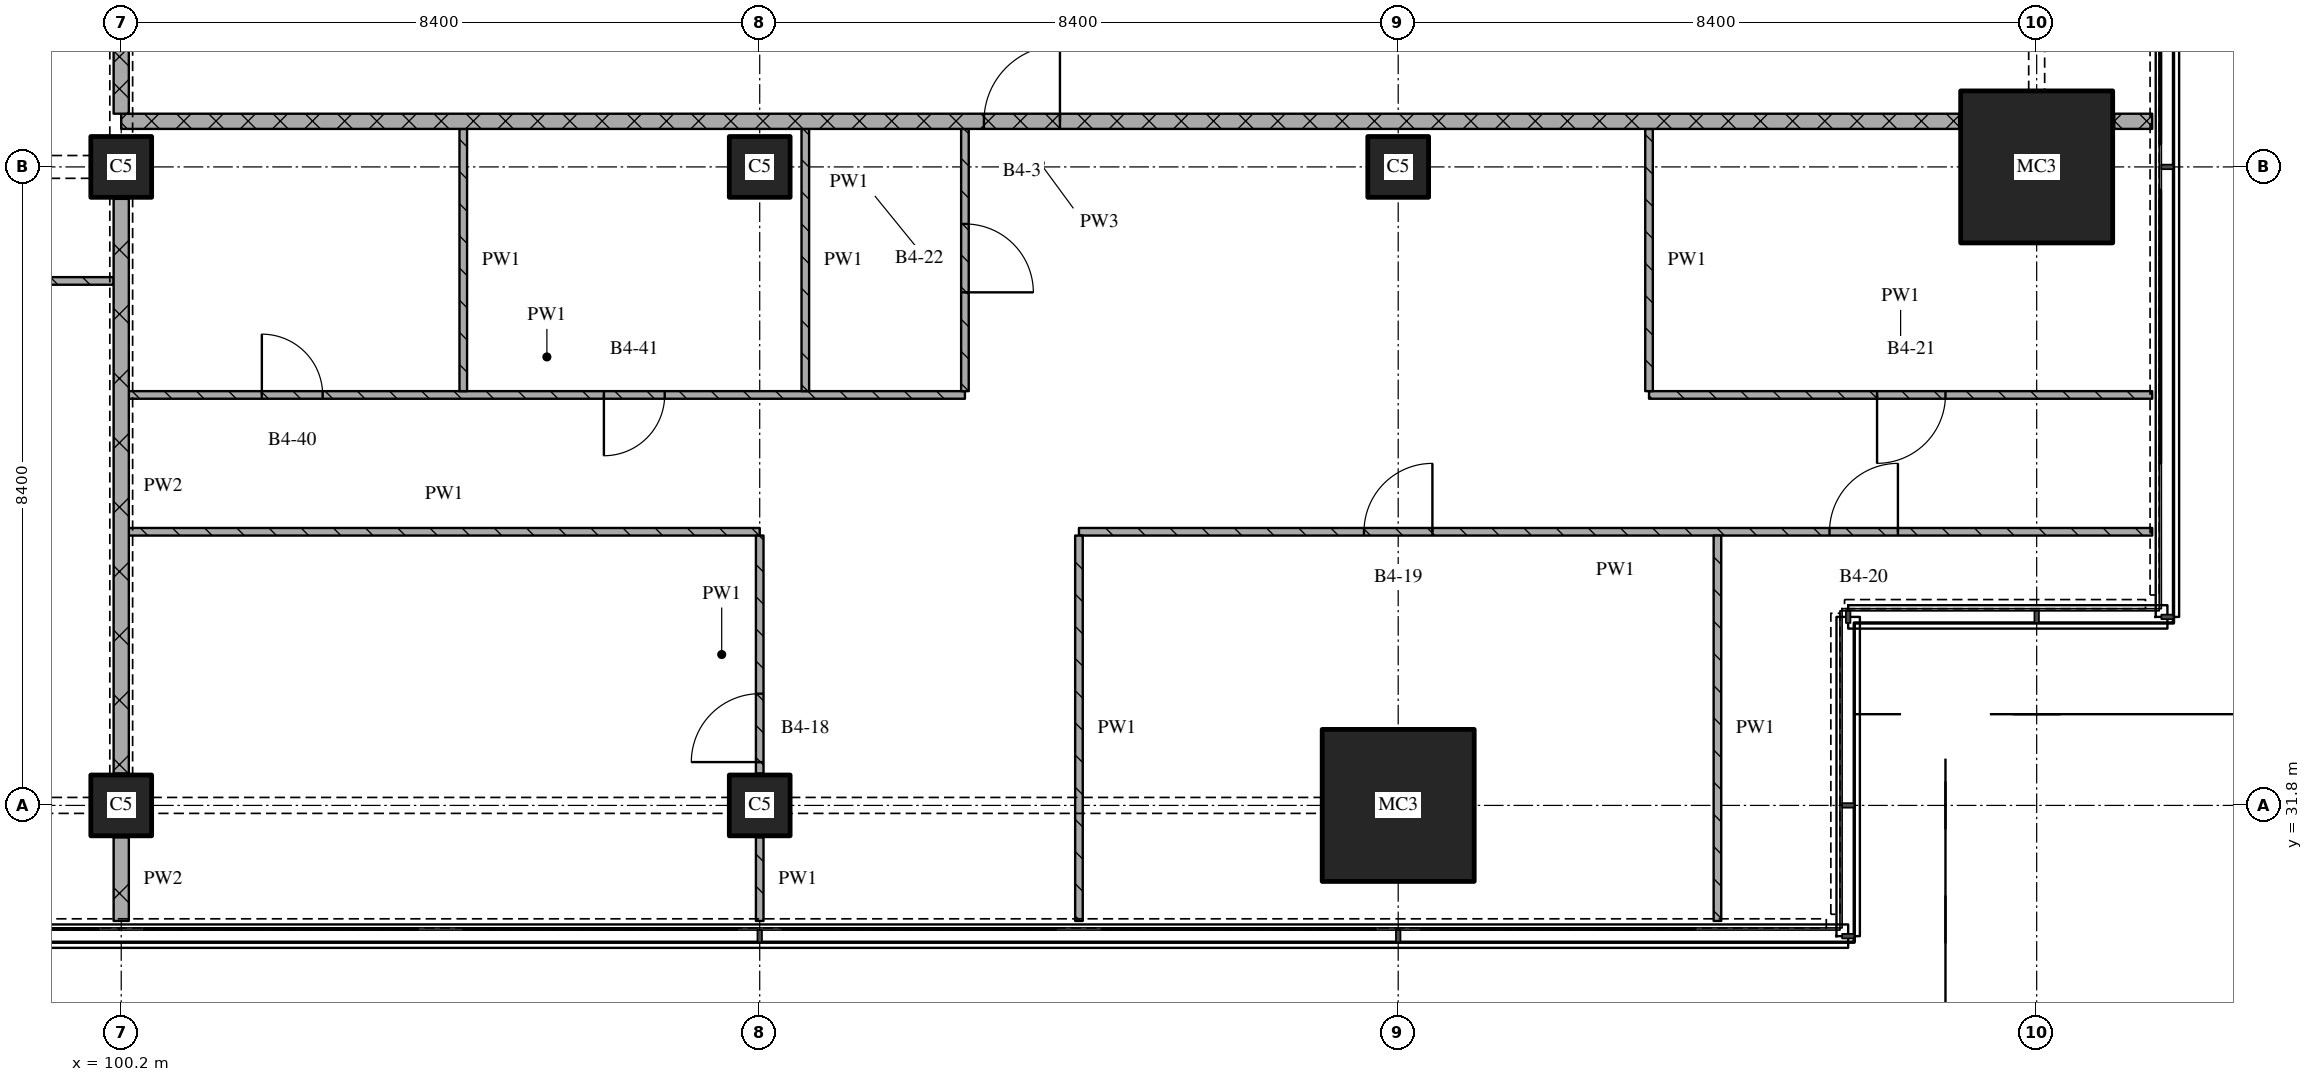
"""IFC4 building model, lengths in metres.
Left out: names, types, materials, properties, quantities, classifications, styles, units other than length and angle.
Written with IfcOpenShell. Run it as: python <this file> out.ifc"""

import sys

from ifc_helpers import new_model, si_unit, direction, frame, frame_2d, origin, origin_2d, place, context, subcontext, project, spatial, rectangle, extrude, element, fill, save


model = new_model("IFC4")
c1 = context("Model", 3, precision=1e-05, world=origin(), true_north=direction((0.0, 1.0)))
c2 = subcontext(c1, "Body", "Model", "MODEL_VIEW")
j1 = project(units=[si_unit("LENGTHUNIT", "METRE"), si_unit("PLANEANGLEUNIT", "RADIAN")], contexts=[c1])
p1 = place(None, origin())
s1 = spatial("IfcSite", under=j1, at=p1, CompositionType="ELEMENT")
p2 = place(p1, origin())
s2 = spatial("IfcBuilding", under=s1, at=p2, CompositionType="ELEMENT")
p3 = place(p2, frame((0.0, 0.0, 127.65)))
s3 = spatial("IfcBuildingStorey", under=s2, at=p3, CompositionType="ELEMENT", Elevation=127.65)
for number, where, z_axis, x_axis in (
    (1, (100.2, 31.8, 0.0), (0.0, 0.0, 1.0), (1.0, 0.0, 0.0)),
    (2, (100.2, 40.2, 0.0), (0.0, 0.0, 1.0), (1.0, 0.0, 0.0)),
    (3, (108.6, 31.8, 0.0), (0.0, 0.0, 1.0), (1.0, 0.0, 0.0)),
    (4, (108.6, 40.2, 0.0), (0.0, 0.0, 1.0), (1.0, 0.0, 0.0)),
):
    element("IfcColumn", number, at=place(p3, frame(where, z_axis=z_axis, x_axis=x_axis)), inside=s3, PredefinedType="COLUMN", context=c2, shape_type="SweptSolid", body=[
        extrude(rectangle(XDim=0.8, YDim=0.8, at=origin_2d()), origin(), (0.0, 0.0, 1.0), 3.6),
    ])
p4 = place(p3, frame((117.0, 31.8, 0.0), z_axis=(0.0, 0.0, 1.0), x_axis=(1.0, 0.0, 0.0)))
e5 = element("IfcColumn", 5, at=p4, inside=s3, PredefinedType="COLUMN", context=c2, shape_type="SweptSolid", body=[
    extrude(rectangle(XDim=2.0, YDim=2.0, at=origin_2d()), origin(), (0.0, 0.0, 1.0), 3.6),
])
p5 = place(p3, frame((117.0, 40.2, 0.0), z_axis=(0.0, 0.0, 1.0), x_axis=(1.0, 0.0, 0.0)))
e6 = element("IfcColumn", 6, at=p5, inside=s3, PredefinedType="COLUMN", context=c2, shape_type="SweptSolid", body=[
    extrude(rectangle(XDim=0.8, YDim=0.8, at=origin_2d()), origin(), (0.0, 0.0, 1.0), 3.6),
])
p6 = place(p3, frame((125.4, 40.2, 0.0), z_axis=(0.0, 0.0, 1.0), x_axis=(1.0, 0.0, 0.0)))
e7 = element("IfcColumn", 7, at=p6, inside=s3, PredefinedType="COLUMN", context=c2, shape_type="SweptSolid", body=[
    extrude(rectangle(XDim=2.0, YDim=2.0, at=origin_2d()), origin(), (0.0, 0.0, 1.0), 3.6),
])
p7 = place(p3, frame((100.3, 35.4, 0.0), z_axis=(0.0, 0.0, 1.0), x_axis=(1.0, 0.0, 0.0)))
e8 = element("IfcWall", 8, at=p7, inside=s3, PredefinedType="PARTITIONING", context=c2, shape_type="SweptSolid", body=[
    extrude(rectangle(XDim=8.3, YDim=0.1, at=frame_2d((4.15, 0.0))), origin(), (0.0, 0.0, 1.0), 3.32),
])
p8 = place(p3, frame((126.92, 35.4, 0.0), z_axis=(0.0, 0.0, 1.0), x_axis=(-1.0, 0.0, 0.0)))
e9 = element("IfcWall", 9, at=p8, inside=s3, PredefinedType="PARTITIONING", context=c2, shape_type="SweptSolid", body=[
    extrude(rectangle(XDim=14.12, YDim=0.1, at=frame_2d((7.06, 0.0))), origin(), (0.0, 0.0, 1.0), 3.32),
])
p9 = place(p8, frame((3.346, 0.0, 0.0)))
e10 = element("IfcOpeningElement", 10, at=p9, cuts=e9, PredefinedType="OPENING", context=c2, shape_type="SweptSolid", body=[
    extrude(rectangle(XDim=0.9, YDim=2.1, at=frame_2d((0.45, 1.05))), frame((0.0, 0.06, 0.0), z_axis=(0.0, -1.0, 0.0), x_axis=(1.0, 0.0, 0.0)), (0.0, 0.0, 1.0), 0.12),
])
p10 = place(p8, frame((9.47, 0.0, 0.0)))
e11 = element("IfcOpeningElement", 11, at=p10, cuts=e9, PredefinedType="OPENING", context=c2, shape_type="SweptSolid", body=[
    extrude(rectangle(XDim=0.9, YDim=2.1, at=frame_2d((0.45, 1.05))), frame((0.0, 0.06, 0.0), z_axis=(0.0, -1.0, 0.0), x_axis=(1.0, 0.0, 0.0)), (0.0, 0.0, 1.0), 0.12),
])
p11 = place(p3, frame((100.3, 37.2, 0.0), z_axis=(0.0, 0.0, 1.0), x_axis=(1.0, 0.0, 0.0)))
e12 = element("IfcWall", 12, at=p11, inside=s3, PredefinedType="PARTITIONING", context=c2, shape_type="SweptSolid", body=[
    extrude(rectangle(XDim=11.0, YDim=0.1, at=frame_2d((5.5, 0.0))), origin(), (0.0, 0.0, 1.0), 3.32),
])
p12 = place(p11, frame((1.75, 0.0, 0.0)))
e13 = element("IfcOpeningElement", 13, at=p12, cuts=e12, PredefinedType="OPENING", context=c2, shape_type="SweptSolid", body=[
    extrude(rectangle(XDim=0.8, YDim=2.1, at=frame_2d((0.4, 1.05))), frame((0.0, 0.06, 0.0), z_axis=(0.0, -1.0, 0.0), x_axis=(1.0, 0.0, 0.0)), (0.0, 0.0, 1.0), 0.12),
])
p13 = place(p11, frame((6.25, 0.0, 0.0)))
e14 = element("IfcOpeningElement", 14, at=p13, cuts=e12, PredefinedType="OPENING", context=c2, shape_type="SweptSolid", body=[
    extrude(rectangle(XDim=0.8, YDim=2.1, at=frame_2d((0.4, 1.05))), frame((0.0, 0.06, 0.0), z_axis=(0.0, -1.0, 0.0), x_axis=(1.0, 0.0, 0.0)), (0.0, 0.0, 1.0), 0.12),
])
p14 = place(p3, frame((120.3, 37.2, 0.0), z_axis=(0.0, 0.0, 1.0), x_axis=(1.0, 0.0, 0.0)))
e15 = element("IfcWall", 15, at=p14, inside=s3, PredefinedType="PARTITIONING", context=c2, shape_type="SweptSolid", body=[
    extrude(rectangle(XDim=6.62, YDim=0.1, at=frame_2d((3.31, 0.0))), origin(), (0.0, 0.0, 1.0), 3.32),
])
p15 = place(p14, frame((3.0, 0.0, 0.0)))
e16 = element("IfcOpeningElement", 16, at=p15, cuts=e15, PredefinedType="OPENING", context=c2, shape_type="SweptSolid", body=[
    extrude(rectangle(XDim=0.9, YDim=2.1, at=frame_2d((0.45, 1.05))), frame((0.0, 0.06, 0.0), z_axis=(0.0, -1.0, 0.0), x_axis=(1.0, 0.0, 0.0)), (0.0, 0.0, 1.0), 0.12),
])
p16 = place(p3, frame((91.2, 38.7, 0.0), z_axis=(0.0, 0.0, 1.0), x_axis=(1.0, 0.0, 0.0)))
e17 = element("IfcWall", 17, at=p16, inside=s3, PredefinedType="PARTITIONING", context=c2, shape_type="SweptSolid", body=[
    extrude(rectangle(XDim=8.9, YDim=0.1, at=frame_2d((4.45, 0.0))), origin(), (0.0, 0.0, 1.0), 3.32),
])
p17 = place(p16, frame((4.05, 0.0, 0.0)))
e18 = element("IfcOpeningElement", 18, at=p17, cuts=e17, PredefinedType="OPENING", context=c2, shape_type="SweptSolid", body=[
    extrude(rectangle(XDim=0.9, YDim=2.1, at=frame_2d((0.45, 1.05))), frame((0.0, 0.06, 0.0), z_axis=(0.0, -1.0, 0.0), x_axis=(1.0, 0.0, 0.0)), (0.0, 0.0, 1.0), 0.12),
])
p18 = place(p3, frame((124.38, 40.8, 0.0), z_axis=(0.0, 0.0, 1.0), x_axis=(-1.0, 0.0, 0.0)))
e19 = element("IfcWall", 19, at=p18, inside=s3, PredefinedType="PARTITIONING", context=c2, shape_type="SweptSolid", body=[
    extrude(rectangle(XDim=24.18, YDim=0.2, at=frame_2d((12.09, 0.0))), origin(), (0.0, 0.0, 1.0), 3.32),
])
p19 = place(p18, frame((11.83, 0.0, 0.0)))
e20 = element("IfcOpeningElement", 20, at=p19, cuts=e19, PredefinedType="OPENING", context=c2, shape_type="SweptSolid", body=[
    extrude(rectangle(XDim=1.0, YDim=2.1, at=frame_2d((0.5, 1.05))), frame((0.0, 0.11, 0.0), z_axis=(0.0, -1.0, 0.0), x_axis=(1.0, 0.0, 0.0)), (0.0, 0.0, 1.0), 0.22),
])
p20 = place(p3, frame((126.42, 40.8, 0.0), z_axis=(0.0, 0.0, 1.0), x_axis=(1.0, 0.0, 0.0)))
e21 = element("IfcWall", 21, at=p20, inside=s3, PredefinedType="PARTITIONING", context=c2, shape_type="SweptSolid", body=[
    extrude(rectangle(XDim=0.5, YDim=0.2, at=frame_2d((0.25, 0.0))), origin(), (0.0, 0.0, 1.0), 3.32),
])
p21 = place(p3, frame((100.2, 43.1, 0.0), z_axis=(0.0, 0.0, 1.0), x_axis=(0.0, -1.0, 0.0)))
e22 = element("IfcWall", 22, at=p21, inside=s3, PredefinedType="PARTITIONING", context=c2, shape_type="SweptSolid", body=[
    extrude(rectangle(XDim=2.2, YDim=0.2, at=frame_2d((1.1, 0.0))), origin(), (0.0, 0.0, 1.0), 2.43),
])
p22 = place(p3, frame((100.2, 31.38, 0.0), z_axis=(0.0, 0.0, 1.0), x_axis=(0.0, -1.0, 0.0)))
e23 = element("IfcWall", 23, at=p22, inside=s3, PredefinedType="PARTITIONING", context=c2, shape_type="SweptSolid", body=[
    extrude(rectangle(XDim=1.1, YDim=0.2, at=frame_2d((0.55, 0.0))), origin(), (0.0, 0.0, 1.0), 3.32),
])
p23 = place(p3, frame((100.2, 39.78, 0.0), z_axis=(0.0, 0.0, 1.0), x_axis=(0.0, -1.0, 0.0)))
e24 = element("IfcWall", 24, at=p23, inside=s3, PredefinedType="PARTITIONING", context=c2, shape_type="SweptSolid", body=[
    extrude(rectangle(XDim=7.56, YDim=0.2, at=frame_2d((3.78, 0.0))), origin(), (0.0, 0.0, 1.0), 2.83),
])
p24 = place(p3, frame((104.7, 40.7, 0.0), z_axis=(0.0, 0.0, 1.0), x_axis=(0.0, -1.0, 0.0)))
e25 = element("IfcWall", 25, at=p24, inside=s3, PredefinedType="PARTITIONING", context=c2, shape_type="SweptSolid", body=[
    extrude(rectangle(XDim=3.45, YDim=0.1, at=frame_2d((1.725, 0.0))), origin(), (0.0, 0.0, 1.0), 3.32),
])
p25 = place(p3, frame((108.6, 31.38, 0.0), z_axis=(0.0, 0.0, 1.0), x_axis=(0.0, -1.0, 0.0)))
e26 = element("IfcWall", 26, at=p25, inside=s3, PredefinedType="PARTITIONING", context=c2, shape_type="SweptSolid", body=[
    extrude(rectangle(XDim=1.1, YDim=0.1, at=frame_2d((0.55, 0.0))), origin(), (0.0, 0.0, 1.0), 3.32),
])
p26 = place(p3, frame((108.6, 32.22, 0.0), z_axis=(0.0, 0.0, 1.0), x_axis=(0.0, 1.0, 0.0)))
e27 = element("IfcWall", 27, at=p26, inside=s3, PredefinedType="PARTITIONING", context=c2, shape_type="SweptSolid", body=[
    extrude(rectangle(XDim=3.13, YDim=0.1, at=frame_2d((1.565, 0.0))), origin(), (0.0, 0.0, 1.0), 3.32),
])
p27 = place(p26, frame((0.15, 0.0, 0.0)))
e28 = element("IfcOpeningElement", 28, at=p27, cuts=e27, PredefinedType="OPENING", context=c2, shape_type="SweptSolid", body=[
    extrude(rectangle(XDim=0.9, YDim=2.1, at=frame_2d((0.45, 1.05))), frame((0.0, 0.06, 0.0), z_axis=(0.0, -1.0, 0.0), x_axis=(1.0, 0.0, 0.0)), (0.0, 0.0, 1.0), 0.12),
])
p28 = place(p3, frame((109.2, 40.7, 0.0), z_axis=(0.0, 0.0, 1.0), x_axis=(0.0, -1.0, 0.0)))
e29 = element("IfcWall", 29, at=p28, inside=s3, PredefinedType="PARTITIONING", context=c2, shape_type="SweptSolid", body=[
    extrude(rectangle(XDim=3.45, YDim=0.1, at=frame_2d((1.725, 0.0))), origin(), (0.0, 0.0, 1.0), 3.32),
])
p29 = place(p3, frame((111.3, 37.25, 0.0), z_axis=(0.0, 0.0, 1.0), x_axis=(0.0, 1.0, 0.0)))
e30 = element("IfcWall", 30, at=p29, inside=s3, PredefinedType="PARTITIONING", context=c2, shape_type="SweptSolid", body=[
    extrude(rectangle(XDim=3.45, YDim=0.1, at=frame_2d((1.725, 0.0))), origin(), (0.0, 0.0, 1.0), 3.32),
])
p30 = place(p29, frame((1.3, 0.0, 0.0)))
e31 = element("IfcOpeningElement", 31, at=p30, cuts=e30, PredefinedType="OPENING", context=c2, shape_type="SweptSolid", body=[
    extrude(rectangle(XDim=0.9, YDim=2.1, at=frame_2d((0.45, 1.05))), frame((0.0, 0.06, 0.0), z_axis=(0.0, -1.0, 0.0), x_axis=(1.0, 0.0, 0.0)), (0.0, 0.0, 1.0), 0.12),
])
p31 = place(p3, frame((112.8, 35.35, 0.0), z_axis=(0.0, 0.0, 1.0), x_axis=(0.0, -1.0, 0.0)))
e32 = element("IfcWall", 32, at=p31, inside=s3, PredefinedType="PARTITIONING", context=c2, shape_type="SweptSolid", body=[
    extrude(rectangle(XDim=5.07, YDim=0.1, at=frame_2d((2.535, 0.0))), origin(), (0.0, 0.0, 1.0), 3.32),
])
p32 = place(p3, frame((120.3, 40.7, 0.0), z_axis=(0.0, 0.0, 1.0), x_axis=(0.0, -1.0, 0.0)))
e33 = element("IfcWall", 33, at=p32, inside=s3, PredefinedType="PARTITIONING", context=c2, shape_type="SweptSolid", body=[
    extrude(rectangle(XDim=3.45, YDim=0.1, at=frame_2d((1.725, 0.0))), origin(), (0.0, 0.0, 1.0), 3.32),
])
p33 = place(p3, frame((121.2, 35.35, 0.0), z_axis=(0.0, 0.0, 1.0), x_axis=(0.0, -1.0, 0.0)))
e34 = element("IfcWall", 34, at=p33, inside=s3, PredefinedType="PARTITIONING", context=c2, shape_type="SweptSolid", body=[
    extrude(rectangle(XDim=5.07, YDim=0.1, at=frame_2d((2.535, 0.0))), origin(), (0.0, 0.0, 1.0), 3.32),
])
p34 = place(p9, origin())
e35 = element("IfcDoor", 35, at=p34, inside=s3, OperationType="SINGLE_SWING_RIGHT", PredefinedType="DOOR", context=c2, shape_type="SweptSolid", body=[
    extrude(rectangle(XDim=0.9, YDim=2.1, at=frame_2d((0.45, 1.05))), frame((0.0, 0.025, 0.0), z_axis=(0.0, -1.0, 0.0), x_axis=(1.0, 0.0, 0.0)), (0.0, 0.0, 1.0), 0.05),
])
fill(e10, e35)
p35 = place(p10, origin())
e36 = element("IfcDoor", 36, at=p35, inside=s3, OperationType="SINGLE_SWING_RIGHT", PredefinedType="DOOR", context=c2, shape_type="SweptSolid", body=[
    extrude(rectangle(XDim=0.9, YDim=2.1, at=frame_2d((0.45, 1.05))), frame((0.0, 0.025, 0.0), z_axis=(0.0, -1.0, 0.0), x_axis=(1.0, 0.0, 0.0)), (0.0, 0.0, 1.0), 0.05),
])
fill(e11, e36)
p36 = place(p12, origin())
e37 = element("IfcDoor", 37, at=p36, inside=s3, OperationType="SINGLE_SWING_LEFT", PredefinedType="DOOR", context=c2, shape_type="SweptSolid", body=[
    extrude(rectangle(XDim=0.8, YDim=2.1, at=frame_2d((0.4, 1.05))), frame((0.0, 0.025, 0.0), z_axis=(0.0, -1.0, 0.0), x_axis=(1.0, 0.0, 0.0)), (0.0, 0.0, 1.0), 0.05),
])
fill(e13, e37)
p37 = place(p13, origin())
e38 = element("IfcDoor", 38, at=p37, inside=s3, OperationType="SINGLE_SWING_RIGHT", PredefinedType="DOOR", context=c2, shape_type="SweptSolid", body=[
    extrude(rectangle(XDim=0.8, YDim=2.1, at=frame_2d((0.4, 1.05))), frame((0.0, 0.025, 0.0), z_axis=(0.0, -1.0, 0.0), x_axis=(1.0, 0.0, 0.0)), (0.0, 0.0, 1.0), 0.05),
])
fill(e14, e38)
p38 = place(p15, origin())
e39 = element("IfcDoor", 39, at=p38, inside=s3, OperationType="SINGLE_SWING_RIGHT", PredefinedType="DOOR", context=c2, shape_type="SweptSolid", body=[
    extrude(rectangle(XDim=0.9, YDim=2.1, at=frame_2d((0.45, 1.05))), frame((0.0, 0.025, 0.0), z_axis=(0.0, -1.0, 0.0), x_axis=(1.0, 0.0, 0.0)), (0.0, 0.0, 1.0), 0.05),
])
fill(e16, e39)
p39 = place(p19, origin())
e40 = element("IfcDoor", 40, at=p39, inside=s3, OperationType="SINGLE_SWING_RIGHT", PredefinedType="DOOR", context=c2, shape_type="SweptSolid", body=[
    extrude(rectangle(XDim=1.0, YDim=2.1, at=frame_2d((0.5, 1.05))), frame((0.0, 0.025, 0.0), z_axis=(0.0, -1.0, 0.0), x_axis=(1.0, 0.0, 0.0)), (0.0, 0.0, 1.0), 0.05),
])
fill(e20, e40)
p40 = place(p27, origin())
e41 = element("IfcDoor", 41, at=p40, inside=s3, OperationType="SINGLE_SWING_LEFT", PredefinedType="DOOR", context=c2, shape_type="SweptSolid", body=[
    extrude(rectangle(XDim=0.9, YDim=2.1, at=frame_2d((0.45, 1.05))), frame((0.0, 0.025, 0.0), z_axis=(0.0, -1.0, 0.0), x_axis=(1.0, 0.0, 0.0)), (0.0, 0.0, 1.0), 0.05),
])
fill(e28, e41)
p41 = place(p30, origin())
e42 = element("IfcDoor", 42, at=p41, inside=s3, OperationType="SINGLE_SWING_RIGHT", PredefinedType="DOOR", context=c2, shape_type="SweptSolid", body=[
    extrude(rectangle(XDim=0.9, YDim=2.1, at=frame_2d((0.45, 1.05))), frame((0.0, 0.025, 0.0), z_axis=(0.0, -1.0, 0.0), x_axis=(1.0, 0.0, 0.0)), (0.0, 0.0, 1.0), 0.05),
])
fill(e31, e42)
save(model, sys.argv[1])
